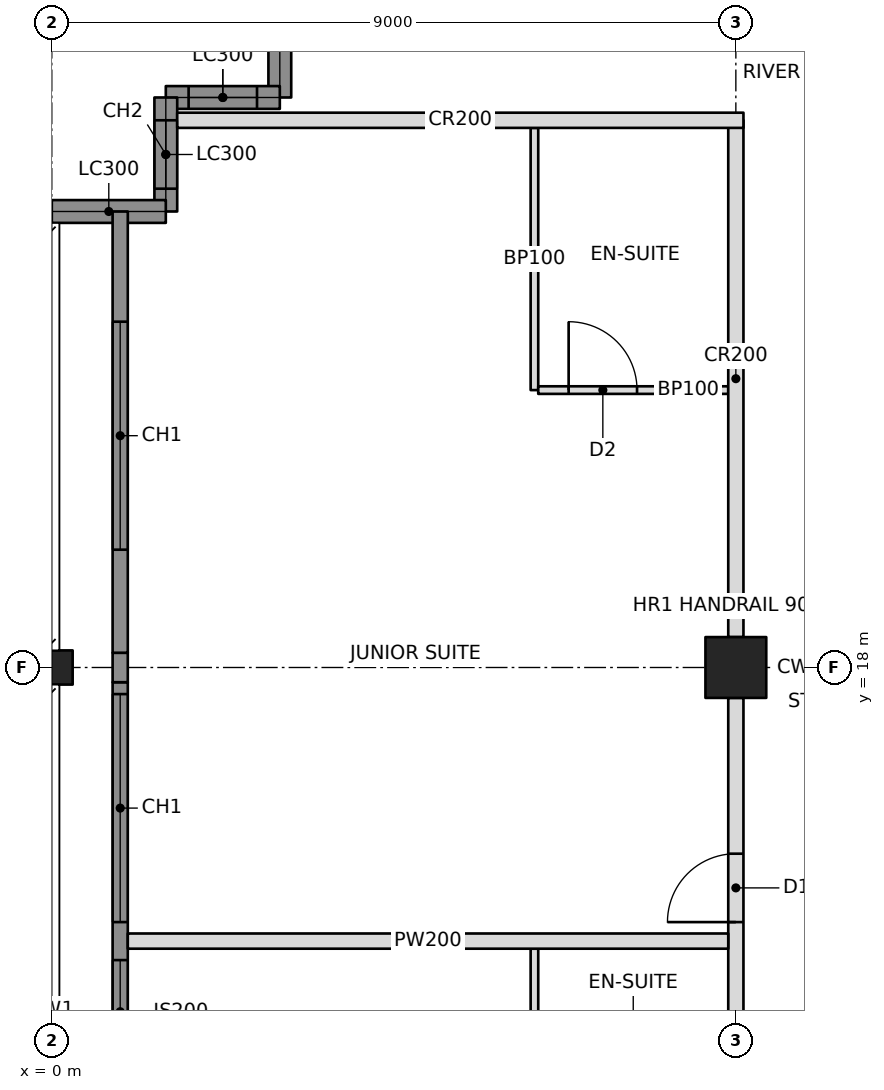
"""IFC4 building model, lengths in metres.
Left out: names, types, materials, properties, quantities, classifications, styles, units other than length and angle.
Written with IfcOpenShell. Run it as: python <this file> out.ifc"""

import sys

from ifc_helpers import new_model, si_unit, direction, frame, frame_2d, origin, origin_2d, place, context, subcontext, project, spatial, rectangle, hollow_rectangle, i_section, extrude, element, fill, save


model = new_model("IFC4")
c1 = context("Model", 3, precision=1e-05, world=origin(), true_north=direction((0.0, 1.0)))
c2 = subcontext(c1, "Body", "Model", "MODEL_VIEW")
j1 = project(units=[si_unit("LENGTHUNIT", "METRE"), si_unit("PLANEANGLEUNIT", "RADIAN")], contexts=[c1])
p1 = place(None, origin())
s1 = spatial("IfcSite", under=j1, at=p1, CompositionType="ELEMENT")
p2 = place(p1, origin())
s2 = spatial("IfcBuilding", under=s1, at=p2, CompositionType="ELEMENT")
p3 = place(p2, frame((0.0, 0.0, 180.8)))
s3 = spatial("IfcBuildingStorey", under=s2, at=p3, CompositionType="ELEMENT", Elevation=180.8)
p4 = place(p3, frame((0.0, 18.0, 0.0), z_axis=(0.0, 0.0, 1.0), x_axis=(0.0, 1.0, 0.0)))
e1 = element("IfcColumn", 1, at=p4, inside=s3, PredefinedType="COLUMN", context=c2, shape_type="SweptSolid", body=[
    extrude(i_section(OverallWidth=0.449, OverallDepth=0.549, WebThickness=0.072, FlangeThickness=0.115, at=origin_2d()), origin(), (0.0, 0.0, 1.0), 3.4),
])
p5 = place(p3, frame((9.0, 18.0, 0.0), z_axis=(0.0, 0.0, 1.0), x_axis=(1.0, 0.0, 0.0)))
e2 = element("IfcColumn", 2, at=p5, inside=s3, PredefinedType="COLUMN", context=c2, shape_type="SweptSolid", body=[
    extrude(hollow_rectangle(XDim=0.8, YDim=0.8, WallThickness=0.06, at=origin_2d()), origin(), (0.0, 0.0, 1.0), 3.4),
])
p6 = place(p3, frame((3.0, 27.0, 0.0), z_axis=(0.0, 0.0, 1.0), x_axis=(0.0, -1.0, 0.0)))
e3 = element("IfcWall", 3, at=p6, inside=s3, PredefinedType="SOLIDWALL", context=c2, shape_type="SweptSolid", body=[
    extrude(rectangle(XDim=1.5, YDim=0.3, at=frame_2d((0.75, 0.0))), origin(), (0.0, 0.0, 1.0), 2.42),
])
p7 = place(p3, frame((3.0, 25.5, 0.0), z_axis=(0.0, 0.0, 1.0), x_axis=(-1.0, 0.0, 0.0)))
e4 = element("IfcWall", 4, at=p7, inside=s3, PredefinedType="SOLIDWALL", context=c2, shape_type="SweptSolid", body=[
    extrude(rectangle(XDim=1.5, YDim=0.3, at=frame_2d((0.75, 0.0))), origin(), (0.0, 0.0, 1.0), 3.2),
])
p8 = place(p7, frame((0.3, 0.0, 0.6)))
e5 = element("IfcOpeningElement", 5, at=p8, cuts=e4, PredefinedType="OPENING", context=c2, shape_type="SweptSolid", body=[
    extrude(rectangle(XDim=0.9, YDim=2.2, at=frame_2d((0.45, 1.1))), frame((0.0, 0.16, 0.0), z_axis=(0.0, -1.0, 0.0), x_axis=(1.0, 0.0, 0.0)), (0.0, 0.0, 1.0), 0.32),
])
p9 = place(p3, frame((1.5, 25.5, 0.0), z_axis=(0.0, 0.0, 1.0), x_axis=(0.0, -1.0, 0.0)))
e6 = element("IfcWall", 6, at=p9, inside=s3, PredefinedType="SOLIDWALL", context=c2, shape_type="SweptSolid", body=[
    extrude(rectangle(XDim=1.5, YDim=0.3, at=frame_2d((0.75, 0.0))), origin(), (0.0, 0.0, 1.0), 3.2),
])
p10 = place(p9, frame((0.3, 0.0, 0.6)))
e7 = element("IfcOpeningElement", 7, at=p10, cuts=e6, PredefinedType="OPENING", context=c2, shape_type="SweptSolid", body=[
    extrude(rectangle(XDim=0.9, YDim=2.2, at=frame_2d((0.45, 1.1))), frame((0.0, 0.16, 0.0), z_axis=(0.0, -1.0, 0.0), x_axis=(1.0, 0.0, 0.0)), (0.0, 0.0, 1.0), 0.32),
])
p11 = place(p3, frame((1.5, 24.0, 0.0), z_axis=(0.0, 0.0, 1.0), x_axis=(-1.0, 0.0, 0.0)))
e8 = element("IfcWall", 8, at=p11, inside=s3, PredefinedType="SOLIDWALL", context=c2, shape_type="SweptSolid", body=[
    extrude(rectangle(XDim=1.5, YDim=0.3, at=frame_2d((0.75, 0.0))), origin(), (0.0, 0.0, 1.0), 2.42),
])
p12 = place(p3, frame((9.0, 10.8, 0.0), z_axis=(0.0, 0.0, 1.0), x_axis=(0.0, 1.0, 0.0)))
e9 = element("IfcWall", 9, at=p12, inside=s3, PredefinedType="PARTITIONING", context=c2, shape_type="SweptSolid", body=[
    extrude(rectangle(XDim=6.8, YDim=0.2, at=frame_2d((3.4, 0.0))), origin(), (0.0, 0.0, 1.0), 2.405),
])
p13 = place(p12, frame((0.25, 0.0, 0.0)))
e10 = element("IfcOpeningElement", 10, at=p13, cuts=e9, PredefinedType="OPENING", context=c2, shape_type="SweptSolid", body=[
    extrude(rectangle(XDim=0.9, YDim=2.1, at=frame_2d((0.45, 1.05))), frame((0.0, 0.11, 0.0), z_axis=(0.0, -1.0, 0.0), x_axis=(1.0, 0.0, 0.0)), (0.0, 0.0, 1.0), 0.22),
])
p14 = place(p12, frame((3.85, 0.0, 0.0)))
e11 = element("IfcOpeningElement", 11, at=p14, cuts=e9, PredefinedType="OPENING", context=c2, shape_type="SweptSolid", body=[
    extrude(rectangle(XDim=0.9, YDim=2.1, at=frame_2d((0.45, 1.05))), frame((0.0, 0.11, 0.0), z_axis=(0.0, -1.0, 0.0), x_axis=(1.0, 0.0, 0.0)), (0.0, 0.0, 1.0), 0.22),
])
p15 = place(p3, frame((9.0, 18.4, 0.0), z_axis=(0.0, 0.0, 1.0), x_axis=(0.0, 1.0, 0.0)))
e12 = element("IfcWall", 12, at=p15, inside=s3, PredefinedType="PARTITIONING", context=c2, shape_type="SweptSolid", body=[
    extrude(rectangle(XDim=6.8, YDim=0.2, at=frame_2d((3.4, 0.0))), origin(), (0.0, 0.0, 1.0), 2.405),
])
p16 = place(p3, frame((1.65, 25.2, 0.0), z_axis=(0.0, 0.0, 1.0), x_axis=(1.0, 0.0, 0.0)))
e13 = element("IfcWall", 13, at=p16, inside=s3, PredefinedType="PARTITIONING", context=c2, shape_type="SweptSolid", body=[
    extrude(rectangle(XDim=7.45, YDim=0.2, at=frame_2d((3.725, 0.0))), origin(), (0.0, 0.0, 1.0), 2.404),
])
p17 = place(p3, frame((8.9, 14.4, 0.0), z_axis=(0.0, 0.0, 1.0), x_axis=(-1.0, 0.0, 0.0)))
e14 = element("IfcWall", 14, at=p17, inside=s3, PredefinedType="PARTITIONING", context=c2, shape_type="SweptSolid", body=[
    extrude(rectangle(XDim=7.9, YDim=0.2, at=frame_2d((3.95, 0.0))), origin(), (0.0, 0.0, 1.0), 2.404),
])
p18 = place(p3, frame((6.35, 12.25, 0.0), z_axis=(0.0, 0.0, 1.0), x_axis=(0.0, 1.0, 0.0)))
e15 = element("IfcWall", 15, at=p18, inside=s3, PredefinedType="PARTITIONING", context=c2, shape_type="SweptSolid", body=[
    extrude(rectangle(XDim=2.05, YDim=0.1, at=frame_2d((1.025, 0.0))), origin(), (0.0, 0.0, 1.0), 3.2),
])
p19 = place(p3, frame((6.35, 21.65, 0.0), z_axis=(0.0, 0.0, 1.0), x_axis=(0.0, 1.0, 0.0)))
e16 = element("IfcWall", 16, at=p19, inside=s3, PredefinedType="PARTITIONING", context=c2, shape_type="SweptSolid", body=[
    extrude(rectangle(XDim=3.45, YDim=0.1, at=frame_2d((1.725, 0.0))), origin(), (0.0, 0.0, 1.0), 3.2),
])
p20 = place(p3, frame((8.9, 21.65, 0.0), z_axis=(0.0, 0.0, 1.0), x_axis=(-1.0, 0.0, 0.0)))
e17 = element("IfcWall", 17, at=p20, inside=s3, PredefinedType="PARTITIONING", context=c2, shape_type="SweptSolid", body=[
    extrude(rectangle(XDim=2.5, YDim=0.1, at=frame_2d((1.25, 0.0))), origin(), (0.0, 0.0, 1.0), 2.404),
])
p21 = place(p20, frame((1.2, 0.0, 0.0)))
e18 = element("IfcOpeningElement", 18, at=p21, cuts=e17, PredefinedType="OPENING", context=c2, shape_type="SweptSolid", body=[
    extrude(rectangle(XDim=0.9, YDim=2.1, at=frame_2d((0.45, 1.05))), frame((0.0, 0.06, 0.0), z_axis=(0.0, -1.0, 0.0), x_axis=(1.0, 0.0, 0.0)), (0.0, 0.0, 1.0), 0.12),
])
p22 = place(p3, frame((0.9, 9.135, 0.0), z_axis=(0.0, 0.0, 1.0), x_axis=(0.0, 1.0, 0.0)))
e19 = element("IfcWall", 19, at=p22, inside=s3, PredefinedType="SOLIDWALL", context=c2, shape_type="SweptSolid", body=[
    extrude(rectangle(XDim=8.671, YDim=0.2, at=frame_2d((4.335, 0.0))), origin(), (0.0, 0.0, 1.0), 3.2),
])
p23 = place(p22, frame((2.015, 0.0, 0.6)))
e20 = element("IfcOpeningElement", 20, at=p23, cuts=e19, PredefinedType="OPENING", context=c2, shape_type="SweptSolid", body=[
    extrude(rectangle(XDim=3.0, YDim=2.2, at=frame_2d((1.5, 1.1))), frame((0.0, 0.11, 0.0), z_axis=(0.0, -1.0, 0.0), x_axis=(1.0, 0.0, 0.0)), (0.0, 0.0, 1.0), 0.22),
])
p24 = place(p22, frame((5.515, 0.0, 0.6)))
e21 = element("IfcOpeningElement", 21, at=p24, cuts=e19, PredefinedType="OPENING", context=c2, shape_type="SweptSolid", body=[
    extrude(rectangle(XDim=3.0, YDim=2.2, at=frame_2d((1.5, 1.1))), frame((0.0, 0.11, 0.0), z_axis=(0.0, -1.0, 0.0), x_axis=(1.0, 0.0, 0.0)), (0.0, 0.0, 1.0), 0.22),
])
p25 = place(p3, frame((0.9, 17.806, 0.0), z_axis=(0.0, 0.0, 1.0), x_axis=(0.0, 1.0, 0.0)))
e22 = element("IfcWall", 22, at=p25, inside=s3, PredefinedType="SOLIDWALL", context=c2, shape_type="SweptSolid", body=[
    extrude(rectangle(XDim=0.388, YDim=0.2, at=frame_2d((0.194, 0.0))), origin(), (0.0, 0.0, 1.0), 2.404),
])
p26 = place(p3, frame((0.9, 18.194, 0.0), z_axis=(0.0, 0.0, 1.0), x_axis=(0.0, 1.0, 0.0)))
e23 = element("IfcWall", 23, at=p26, inside=s3, PredefinedType="SOLIDWALL", context=c2, shape_type="SweptSolid", body=[
    extrude(rectangle(XDim=5.806, YDim=0.2, at=frame_2d((2.903, 0.0))), origin(), (0.0, 0.0, 1.0), 3.2),
])
p27 = place(p26, frame((1.356, 0.0, 0.6)))
e24 = element("IfcOpeningElement", 24, at=p27, cuts=e23, PredefinedType="OPENING", context=c2, shape_type="SweptSolid", body=[
    extrude(rectangle(XDim=3.0, YDim=2.2, at=frame_2d((1.5, 1.1))), frame((0.0, 0.11, 0.0), z_axis=(0.0, -1.0, 0.0), x_axis=(1.0, 0.0, 0.0)), (0.0, 0.0, 1.0), 0.22),
])
p28 = place(p8, origin())
e25 = element("IfcWindow", 25, at=p28, inside=s3, PartitioningType="SINGLE_PANEL", PredefinedType="WINDOW", context=c2, shape_type="SweptSolid", body=[
    extrude(rectangle(XDim=0.9, YDim=2.2, at=frame_2d((0.45, 1.1))), frame((0.0, 0.03, 0.0), z_axis=(0.0, -1.0, 0.0), x_axis=(1.0, 0.0, 0.0)), (0.0, 0.0, 1.0), 0.06),
])
fill(e5, e25)
p29 = place(p10, origin())
e26 = element("IfcWindow", 26, at=p29, inside=s3, PartitioningType="SINGLE_PANEL", PredefinedType="WINDOW", context=c2, shape_type="SweptSolid", body=[
    extrude(rectangle(XDim=0.9, YDim=2.2, at=frame_2d((0.45, 1.1))), frame((0.0, 0.03, 0.0), z_axis=(0.0, -1.0, 0.0), x_axis=(1.0, 0.0, 0.0)), (0.0, 0.0, 1.0), 0.06),
])
fill(e7, e26)
p30 = place(p23, origin())
e27 = element("IfcWindow", 27, at=p30, inside=s3, PartitioningType="TRIPLE_PANEL_VERTICAL", PredefinedType="WINDOW", context=c2, shape_type="SweptSolid", body=[
    extrude(rectangle(XDim=3.0, YDim=2.2, at=frame_2d((1.5, 1.1))), frame((0.0, 0.03, 0.0), z_axis=(0.0, -1.0, 0.0), x_axis=(1.0, 0.0, 0.0)), (0.0, 0.0, 1.0), 0.06),
])
fill(e20, e27)
p31 = place(p24, origin())
e28 = element("IfcWindow", 28, at=p31, inside=s3, PartitioningType="TRIPLE_PANEL_VERTICAL", PredefinedType="WINDOW", context=c2, shape_type="SweptSolid", body=[
    extrude(rectangle(XDim=3.0, YDim=2.2, at=frame_2d((1.5, 1.1))), frame((0.0, 0.03, 0.0), z_axis=(0.0, -1.0, 0.0), x_axis=(1.0, 0.0, 0.0)), (0.0, 0.0, 1.0), 0.06),
])
fill(e21, e28)
p32 = place(p27, origin())
e29 = element("IfcWindow", 29, at=p32, inside=s3, PartitioningType="TRIPLE_PANEL_VERTICAL", PredefinedType="WINDOW", context=c2, shape_type="SweptSolid", body=[
    extrude(rectangle(XDim=3.0, YDim=2.2, at=frame_2d((1.5, 1.1))), frame((0.0, 0.03, 0.0), z_axis=(0.0, -1.0, 0.0), x_axis=(1.0, 0.0, 0.0)), (0.0, 0.0, 1.0), 0.06),
])
fill(e24, e29)
p33 = place(p21, frame((0.9, 0.0, 0.0), z_axis=(0.0, 0.0, 1.0), x_axis=(-1.0, 0.0, 0.0)))
e30 = element("IfcDoor", 30, at=p33, inside=s3, OperationType="SINGLE_SWING_LEFT", PredefinedType="DOOR", context=c2, shape_type="SweptSolid", body=[
    extrude(rectangle(XDim=0.9, YDim=2.1, at=frame_2d((0.45, 1.05))), frame((0.0, 0.025, 0.0), z_axis=(0.0, -1.0, 0.0), x_axis=(1.0, 0.0, 0.0)), (0.0, 0.0, 1.0), 0.05),
])
fill(e18, e30)
p34 = place(p14, origin())
e31 = element("IfcDoor", 31, at=p34, inside=s3, OperationType="SINGLE_SWING_LEFT", PredefinedType="DOOR", context=c2, shape_type="SweptSolid", body=[
    extrude(rectangle(XDim=0.9, YDim=2.1, at=frame_2d((0.45, 1.05))), frame((0.0, 0.025, 0.0), z_axis=(0.0, -1.0, 0.0), x_axis=(1.0, 0.0, 0.0)), (0.0, 0.0, 1.0), 0.05),
])
fill(e11, e31)
save(model, sys.argv[1])
